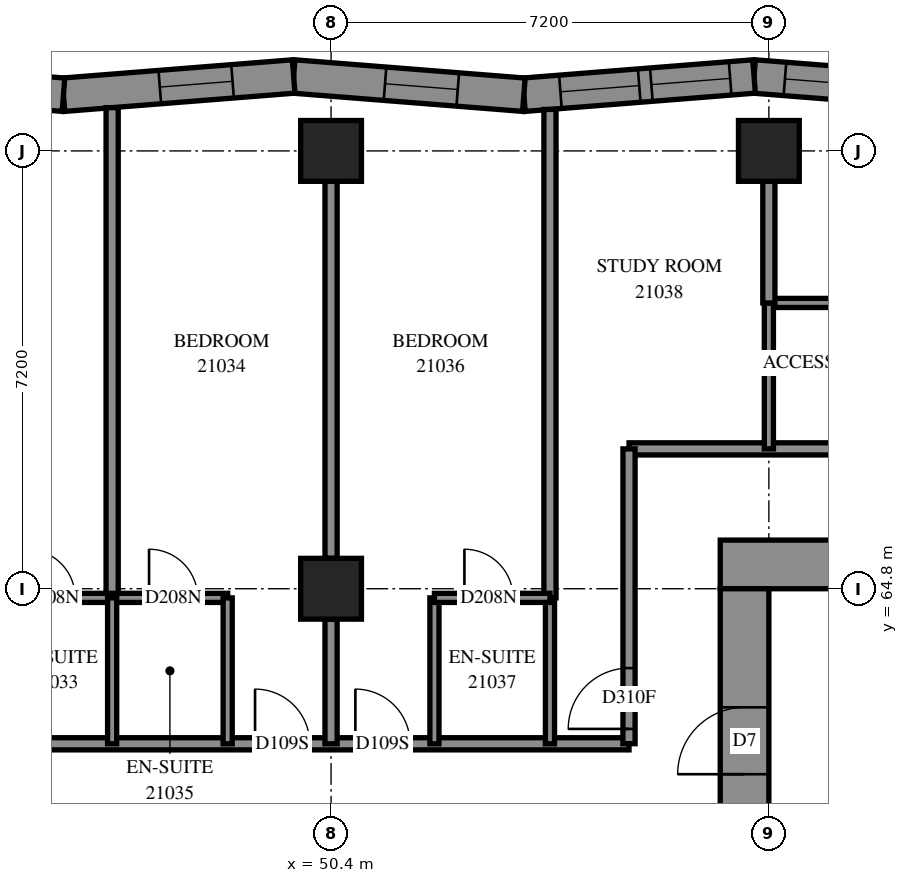
"""IFC4 building model, lengths in metres.
Left out: names, types, materials, properties, quantities, classifications, styles, units other than length and angle.
Written with IfcOpenShell. Run it as: python <this file> out.ifc"""

import sys

from ifc_helpers import new_model, si_unit, direction, frame, frame_2d, origin, origin_2d, place, context, subcontext, project, spatial, polyline, rectangle, outline, extrude, element, fill, save


model = new_model("IFC4")
c1 = context("Model", 3, precision=1e-05, world=origin(), true_north=direction((0.0, 1.0)))
c2 = subcontext(c1, "Body", "Model", "MODEL_VIEW")
j1 = project(units=[si_unit("LENGTHUNIT", "METRE"), si_unit("PLANEANGLEUNIT", "RADIAN")], contexts=[c1])
p1 = place(None, origin())
s1 = spatial("IfcSite", under=j1, at=p1, CompositionType="ELEMENT")
p2 = place(p1, origin())
s2 = spatial("IfcBuilding", under=s1, at=p2, CompositionType="ELEMENT")
p3 = place(p2, frame((0.0, 0.0, 81.2)))
s3 = spatial("IfcBuildingStorey", under=s2, at=p3, CompositionType="ELEMENT", Elevation=81.2)
for number, where, z_axis, x_axis in (
    (1, (50.4, 64.8, 0.0), (0.0, 0.0, 1.0), (1.0, 0.0, 0.0)),
    (2, (50.4, 72.0, 0.0), (0.0, 0.0, 1.0), (1.0, 0.0, 0.0)),
    (3, (57.6, 72.0, 0.0), (0.0, 0.0, 1.0), (1.0, 0.0, 0.0)),
):
    element("IfcColumn", number, at=place(p3, frame(where, z_axis=z_axis, x_axis=x_axis)), inside=s3, PredefinedType="COLUMN", context=c2, shape_type="SweptSolid", body=[
        extrude(rectangle(XDim=1.0, YDim=1.0, at=origin_2d()), origin(), (0.0, 0.0, 1.0), 3.1),
    ])
p4 = place(p3, frame((56.8, 65.2, -0.3), z_axis=(0.0, 0.0, 1.0), x_axis=(1.0, 0.0, 0.0)))
e4 = element("IfcWall", 4, at=p4, inside=s3, PredefinedType="SHEAR", context=c2, shape_type="SweptSolid", body=[
    extrude(rectangle(XDim=16.0, YDim=0.8, at=frame_2d((8.0, 0.0))), origin(), (0.0, 0.0, 1.0), 2.7),
])
p5 = place(p4, frame((10.8, 0.0, 0.3)))
e5 = element("IfcOpeningElement", 5, at=p5, cuts=e4, PredefinedType="OPENING", context=c2, shape_type="SweptSolid", body=[
    extrude(rectangle(XDim=0.8, YDim=2.1, at=frame_2d((0.4, 1.05))), frame((0.0, 0.41, 0.0), z_axis=(0.0, -1.0, 0.0), x_axis=(1.0, 0.0, 0.0)), (0.0, 0.0, 1.0), 0.82),
])
p6 = place(p3, frame((57.2, 50.4, -0.3), z_axis=(0.0, 0.0, 1.0), x_axis=(0.0, 1.0, 0.0)))
e6 = element("IfcWall", 6, at=p6, inside=s3, PredefinedType="SHEAR", context=c2, shape_type="SweptSolid", body=[
    extrude(rectangle(XDim=14.4, YDim=0.8, at=frame_2d((7.2, 0.0))), origin(), (0.0, 0.0, 1.0), 2.7),
])
p7 = place(p6, frame((4.55, 0.0, 0.3)))
e7 = element("IfcOpeningElement", 7, at=p7, cuts=e6, PredefinedType="OPENING", context=c2, shape_type="SweptSolid", body=[
    extrude(rectangle(XDim=1.1, YDim=2.1, at=frame_2d((0.55, 1.05))), frame((0.0, 0.41, 0.0), z_axis=(0.0, -1.0, 0.0), x_axis=(1.0, 0.0, 0.0)), (0.0, 0.0, 1.0), 0.82),
])
p8 = place(p6, frame((11.35, 0.0, 0.3)))
e8 = element("IfcOpeningElement", 8, at=p8, cuts=e6, PredefinedType="OPENING", context=c2, shape_type="SweptSolid", body=[
    extrude(rectangle(XDim=1.1, YDim=2.1, at=frame_2d((0.55, 1.05))), frame((0.0, 0.41, 0.0), z_axis=(0.0, -1.0, 0.0), x_axis=(1.0, 0.0, 0.0)), (0.0, 0.0, 1.0), 0.82),
])
p9 = place(p3, frame((61.142, 72.924, 0.0), z_axis=(0.0, 0.0, 1.0), x_axis=(-0.9968746163, 0.078999996, 0.0)))
e9 = element("IfcWall", 9, at=p9, inside=s3, PredefinedType="SOLIDWALL", context=c2, shape_type="SweptSolid", body=[
    extrude(outline(polyline([(0.022, -0.275), (3.819, -0.275), (3.776, 0.275), (-0.022, 0.275), (0.022, -0.275)])), origin(), (0.0, 0.0, 1.0), 3.1),
])
p10 = place(p9, frame((0.488, 0.0, 0.5)))
e10 = element("IfcOpeningElement", 10, at=p10, cuts=e9, PredefinedType="OPENING", context=c2, shape_type="SweptSolid", body=[
    extrude(rectangle(XDim=1.3, YDim=2.45, at=frame_2d((0.65, 1.225))), frame((0.0, 0.285, 0.0), z_axis=(0.0, -1.0, 0.0), x_axis=(1.0, 0.0, 0.0)), (0.0, 0.0, 1.0), 0.57),
])
p11 = place(p9, frame((1.988, 0.0, 0.5)))
e11 = element("IfcOpeningElement", 11, at=p11, cuts=e9, PredefinedType="OPENING", context=c2, shape_type="SweptSolid", body=[
    extrude(rectangle(XDim=1.3, YDim=2.45, at=frame_2d((0.65, 1.225))), frame((0.0, 0.285, 0.0), z_axis=(0.0, -1.0, 0.0), x_axis=(1.0, 0.0, 0.0)), (0.0, 0.0, 1.0), 0.57),
])
p12 = place(p3, frame((57.356, 73.224, 0.0), z_axis=(0.0, 0.0, 1.0), x_axis=(-0.9968746163, -0.078999996, 0.0)))
e12 = element("IfcWall", 12, at=p12, inside=s3, PredefinedType="SOLIDWALL", context=c2, shape_type="SweptSolid", body=[
    extrude(outline(polyline([(-0.022, -0.275), (3.776, -0.275), (3.819, 0.275), (0.022, 0.275), (-0.022, -0.275)])), origin(), (0.0, 0.0, 1.0), 3.1),
])
p13 = place(p12, frame((0.394, 0.0, 0.5)))
e13 = element("IfcOpeningElement", 13, at=p13, cuts=e12, PredefinedType="OPENING", context=c2, shape_type="SweptSolid", body=[
    extrude(rectangle(XDim=1.3, YDim=2.45, at=frame_2d((0.65, 1.225))), frame((0.0, 0.285, 0.0), z_axis=(0.0, -1.0, 0.0), x_axis=(1.0, 0.0, 0.0)), (0.0, 0.0, 1.0), 0.57),
])
p14 = place(p12, frame((1.894, 0.0, 0.5)))
e14 = element("IfcOpeningElement", 14, at=p14, cuts=e12, PredefinedType="OPENING", context=c2, shape_type="SweptSolid", body=[
    extrude(rectangle(XDim=1.3, YDim=2.45, at=frame_2d((0.65, 1.225))), frame((0.0, 0.285, 0.0), z_axis=(0.0, -1.0, 0.0), x_axis=(1.0, 0.0, 0.0)), (0.0, 0.0, 1.0), 0.57),
])
p15 = place(p3, frame((53.571, 72.924, 0.0), z_axis=(0.0, 0.0, 1.0), x_axis=(-0.9968747806, 0.0789979222, 0.0)))
e15 = element("IfcWall", 15, at=p15, inside=s3, PredefinedType="SOLIDWALL", context=c2, shape_type="SweptSolid", body=[
    extrude(outline(polyline([(0.022, -0.275), (3.819, -0.275), (3.776, 0.275), (-0.022, 0.275), (0.022, -0.275)])), origin(), (0.0, 0.0, 1.0), 3.1),
])
p16 = place(p15, frame((1.09, 0.0, 0.5)))
e16 = element("IfcOpeningElement", 16, at=p16, cuts=e15, PredefinedType="OPENING", context=c2, shape_type="SweptSolid", body=[
    extrude(rectangle(XDim=1.2, YDim=2.45, at=frame_2d((0.6, 1.225))), frame((0.0, 0.285, 0.0), z_axis=(0.0, -1.0, 0.0), x_axis=(1.0, 0.0, 0.0)), (0.0, 0.0, 1.0), 0.57),
])
p17 = place(p3, frame((49.785, 73.224, 0.0), z_axis=(0.0, 0.0, 1.0), x_axis=(-0.9968746163, -0.078999996, 0.0)))
e17 = element("IfcWall", 17, at=p17, inside=s3, PredefinedType="SOLIDWALL", context=c2, shape_type="SweptSolid", body=[
    extrude(outline(polyline([(-0.022, -0.275), (3.776, -0.275), (3.819, 0.275), (0.022, 0.275), (-0.022, -0.275)])), origin(), (0.0, 0.0, 1.0), 3.1),
])
p18 = place(p17, frame((1.008, 0.0, 0.5)))
e18 = element("IfcOpeningElement", 18, at=p18, cuts=e17, PredefinedType="OPENING", context=c2, shape_type="SweptSolid", body=[
    extrude(rectangle(XDim=1.2, YDim=2.45, at=frame_2d((0.6, 1.225))), frame((0.0, 0.285, 0.0), z_axis=(0.0, -1.0, 0.0), x_axis=(1.0, 0.0, 0.0)), (0.0, 0.0, 1.0), 0.57),
])
p19 = place(p3, frame((45.999, 72.924, 0.0), z_axis=(0.0, 0.0, 1.0), x_axis=(-0.9968746163, 0.078999996, 0.0)))
e19 = element("IfcWall", 19, at=p19, inside=s3, PredefinedType="SOLIDWALL", context=c2, shape_type="SweptSolid", body=[
    extrude(outline(polyline([(0.022, -0.275), (3.819, -0.275), (3.776, 0.275), (-0.022, 0.275), (0.022, -0.275)])), origin(), (0.0, 0.0, 1.0), 3.1),
])
p20 = place(p19, frame((0.904, 0.0, 0.5)))
e20 = element("IfcOpeningElement", 20, at=p20, cuts=e19, PredefinedType="OPENING", context=c2, shape_type="SweptSolid", body=[
    extrude(rectangle(XDim=1.2, YDim=2.45, at=frame_2d((0.6, 1.225))), frame((0.0, 0.285, 0.0), z_axis=(0.0, -1.0, 0.0), x_axis=(1.0, 0.0, 0.0)), (0.0, 0.0, 1.0), 0.57),
])
p21 = place(p3, frame((33.45, 62.25, 0.0), z_axis=(0.0, 0.0, 1.0), x_axis=(1.0, 0.0, 0.0)))
e21 = element("IfcWall", 21, at=p21, inside=s3, PredefinedType="PARTITIONING", context=c2, shape_type="SweptSolid", body=[
    extrude(rectangle(XDim=21.85, YDim=0.2, at=frame_2d((10.925, 0.0))), origin(), (0.0, 0.0, 1.0), 3.1),
])
p22 = place(p21, frame((0.144, 0.0, 0.0)))
e22 = element("IfcOpeningElement", 22, at=p22, cuts=e21, PredefinedType="OPENING", context=c2, shape_type="SweptSolid", body=[
    extrude(rectangle(XDim=1.0, YDim=2.1, at=frame_2d((0.5, 1.05))), frame((0.0, 0.11, 0.0), z_axis=(0.0, -1.0, 0.0), x_axis=(1.0, 0.0, 0.0)), (0.0, 0.0, 1.0), 0.22),
])
p23 = place(p21, frame((2.95, 0.0, 0.0)))
e23 = element("IfcOpeningElement", 23, at=p23, cuts=e21, PredefinedType="OPENING", context=c2, shape_type="SweptSolid", body=[
    extrude(rectangle(XDim=0.9, YDim=2.1, at=frame_2d((0.45, 1.05))), frame((0.0, 0.11, 0.0), z_axis=(0.0, -1.0, 0.0), x_axis=(1.0, 0.0, 0.0)), (0.0, 0.0, 1.0), 0.22),
])
p24 = place(p21, frame((8.407, 0.0, 0.0)))
e24 = element("IfcOpeningElement", 24, at=p24, cuts=e21, PredefinedType="OPENING", context=c2, shape_type="SweptSolid", body=[
    extrude(rectangle(XDim=0.9, YDim=2.1, at=frame_2d((0.45, 1.05))), frame((0.0, 0.11, 0.0), z_axis=(0.0, -1.0, 0.0), x_axis=(1.0, 0.0, 0.0)), (0.0, 0.0, 1.0), 0.22),
])
p25 = place(p21, frame((15.7, 0.0, 0.0)))
e25 = element("IfcOpeningElement", 25, at=p25, cuts=e21, PredefinedType="OPENING", context=c2, shape_type="SweptSolid", body=[
    extrude(rectangle(XDim=0.9, YDim=2.1, at=frame_2d((0.45, 1.05))), frame((0.0, 0.11, 0.0), z_axis=(0.0, -1.0, 0.0), x_axis=(1.0, 0.0, 0.0)), (0.0, 0.0, 1.0), 0.22),
])
p26 = place(p21, frame((17.35, 0.0, 0.0)))
e26 = element("IfcOpeningElement", 26, at=p26, cuts=e21, PredefinedType="OPENING", context=c2, shape_type="SweptSolid", body=[
    extrude(rectangle(XDim=0.9, YDim=2.1, at=frame_2d((0.45, 1.05))), frame((0.0, 0.11, 0.0), z_axis=(0.0, -1.0, 0.0), x_axis=(1.0, 0.0, 0.0)), (0.0, 0.0, 1.0), 0.22),
])
p27 = place(p3, frame((55.3, 67.1, 0.0), z_axis=(0.0, 0.0, 1.0), x_axis=(1.0, 0.0, 0.0)))
e27 = element("IfcWall", 27, at=p27, inside=s3, PredefinedType="PARTITIONING", context=c2, shape_type="SweptSolid", body=[
    extrude(rectangle(XDim=19.0, YDim=0.2, at=frame_2d((9.5, 0.0))), origin(), (0.0, 0.0, 1.0), 3.1),
])
p28 = place(p27, frame((6.161, 0.0, 0.0)))
e28 = element("IfcOpeningElement", 28, at=p28, cuts=e27, PredefinedType="OPENING", context=c2, shape_type="SweptSolid", body=[
    extrude(rectangle(XDim=0.9, YDim=2.1, at=frame_2d((0.45, 1.05))), frame((0.0, 0.11, 0.0), z_axis=(0.0, -1.0, 0.0), x_axis=(1.0, 0.0, 0.0)), (0.0, 0.0, 1.0), 0.22),
])
p29 = place(p27, frame((13.386, 0.0, 0.0)))
e29 = element("IfcOpeningElement", 29, at=p29, cuts=e27, PredefinedType="OPENING", context=c2, shape_type="SweptSolid", body=[
    extrude(rectangle(XDim=1.0, YDim=2.1, at=frame_2d((0.5, 1.05))), frame((0.0, 0.11, 0.0), z_axis=(0.0, -1.0, 0.0), x_axis=(1.0, 0.0, 0.0)), (0.0, 0.0, 1.0), 0.22),
])
p30 = place(p3, frame((46.8, 64.65, 0.0), z_axis=(0.0, 0.0, 1.0), x_axis=(0.0, 1.0, 0.0)))
e30 = element("IfcWall", 30, at=p30, inside=s3, PredefinedType="PARTITIONING", context=c2, shape_type="SweptSolid", body=[
    extrude(rectangle(XDim=8.062, YDim=0.2, at=frame_2d((4.031, 0.0))), origin(), (0.0, 0.0, 1.0), 3.1),
])
p31 = place(p3, frame((54.0, 64.65, 0.0), z_axis=(0.0, 0.0, 1.0), x_axis=(0.0, 1.0, 0.0)))
e31 = element("IfcWall", 31, at=p31, inside=s3, PredefinedType="PARTITIONING", context=c2, shape_type="SweptSolid", body=[
    extrude(rectangle(XDim=8.032, YDim=0.2, at=frame_2d((4.016, 0.0))), origin(), (0.0, 0.0, 1.0), 3.1),
])
p32 = place(p3, frame((50.4, 65.3, 0.0), z_axis=(0.0, 0.0, 1.0), x_axis=(0.0, 1.0, 0.0)))
e32 = element("IfcWall", 32, at=p32, inside=s3, PredefinedType="PARTITIONING", context=c2, shape_type="SweptSolid", body=[
    extrude(rectangle(XDim=6.2, YDim=0.2, at=frame_2d((3.1, 0.0))), origin(), (0.0, 0.0, 1.0), 3.1),
])
p33 = place(p3, frame((55.3, 62.252, 0.0), z_axis=(0.0, 0.0, 1.0), x_axis=(0.0, 1.0, 0.0)))
e33 = element("IfcWall", 33, at=p33, inside=s3, PredefinedType="PARTITIONING", context=c2, shape_type="SweptSolid", body=[
    extrude(rectangle(XDim=4.848, YDim=0.2, at=frame_2d((2.424, 0.0))), origin(), (0.0, 0.0, 1.0), 3.1),
])
p34 = place(p33, frame((0.243, 0.0, 0.0)))
e34 = element("IfcOpeningElement", 34, at=p34, cuts=e33, PredefinedType="OPENING", context=c2, shape_type="SweptSolid", body=[
    extrude(rectangle(XDim=1.0, YDim=2.1, at=frame_2d((0.5, 1.05))), frame((0.0, 0.11, 0.0), z_axis=(0.0, -1.0, 0.0), x_axis=(1.0, 0.0, 0.0)), (0.0, 0.0, 1.0), 0.22),
])
p35 = place(p3, frame((44.9, 64.65, 0.0), z_axis=(0.0, 0.0, 1.0), x_axis=(1.0, 0.0, 0.0)))
e35 = element("IfcWall", 35, at=p35, inside=s3, PredefinedType="PARTITIONING", context=c2, shape_type="SweptSolid", body=[
    extrude(rectangle(XDim=3.8, YDim=0.15, at=frame_2d((1.9, 0.0))), origin(), (0.0, 0.0, 1.0), 3.1),
])
p36 = place(p35, frame((0.493, 0.0, 0.0)))
e36 = element("IfcOpeningElement", 36, at=p36, cuts=e35, PredefinedType="OPENING", context=c2, shape_type="SweptSolid", body=[
    extrude(rectangle(XDim=0.8, YDim=2.1, at=frame_2d((0.4, 1.05))), frame((0.0, 0.085, 0.0), z_axis=(0.0, -1.0, 0.0), x_axis=(1.0, 0.0, 0.0)), (0.0, 0.0, 1.0), 0.17),
])
p37 = place(p35, frame((2.507, 0.0, 0.0)))
e37 = element("IfcOpeningElement", 37, at=p37, cuts=e35, PredefinedType="OPENING", context=c2, shape_type="SweptSolid", body=[
    extrude(rectangle(XDim=0.8, YDim=2.1, at=frame_2d((0.4, 1.05))), frame((0.0, 0.085, 0.0), z_axis=(0.0, -1.0, 0.0), x_axis=(1.0, 0.0, 0.0)), (0.0, 0.0, 1.0), 0.17),
])
p38 = place(p3, frame((57.6, 69.5, 0.0), z_axis=(0.0, 0.0, 1.0), x_axis=(1.0, 0.0, 0.0)))
e38 = element("IfcWall", 38, at=p38, inside=s3, PredefinedType="PARTITIONING", context=c2, shape_type="SweptSolid", body=[
    extrude(rectangle(XDim=3.2, YDim=0.15, at=frame_2d((1.6, 0.0))), origin(), (0.0, 0.0, 1.0), 3.1),
])
p39 = place(p38, frame((1.196, 0.0, 0.0)))
e39 = element("IfcOpeningElement", 39, at=p39, cuts=e38, PredefinedType="OPENING", context=c2, shape_type="SweptSolid", body=[
    extrude(rectangle(XDim=0.8, YDim=2.1, at=frame_2d((0.4, 1.05))), frame((0.0, 0.085, 0.0), z_axis=(0.0, -1.0, 0.0), x_axis=(1.0, 0.0, 0.0)), (0.0, 0.0, 1.0), 0.17),
])
for number, where, z_axis, x_axis in (
    (40, (46.8, 62.25, 0.0), (0.0, 0.0, 1.0), (0.0, 1.0, 0.0)),
    (41, (48.7, 62.25, 0.0), (0.0, 0.0, 1.0), (0.0, 1.0, 0.0)),
    (42, (52.1, 62.25, 0.0), (0.0, 0.0, 1.0), (0.0, 1.0, 0.0)),
    (43, (54.0, 62.25, 0.0), (0.0, 0.0, 1.0), (0.0, 1.0, 0.0)),
    (44, (57.6, 67.1, 0.0), (0.0, 0.0, 1.0), (0.0, 1.0, 0.0)),
):
    element("IfcWall", number, at=place(p3, frame(where, z_axis=z_axis, x_axis=x_axis)), inside=s3, PredefinedType="PARTITIONING", context=c2, shape_type="SweptSolid", body=[
        extrude(rectangle(XDim=2.4, YDim=0.15, at=frame_2d((1.2, 0.0))), origin(), (0.0, 0.0, 1.0), 3.1),
    ])
p40 = place(p3, frame((50.4, 62.25, 0.0), z_axis=(0.0, 0.0, 1.0), x_axis=(0.0, 1.0, 0.0)))
e45 = element("IfcWall", 45, at=p40, inside=s3, PredefinedType="PARTITIONING", context=c2, shape_type="SweptSolid", body=[
    extrude(rectangle(XDim=2.05, YDim=0.2, at=frame_2d((1.025, 0.0))), origin(), (0.0, 0.0, 1.0), 3.1),
])
p41 = place(p3, frame((57.6, 69.5, 0.0), z_axis=(0.0, 0.0, 1.0), x_axis=(0.0, 1.0, 0.0)))
e46 = element("IfcWall", 46, at=p41, inside=s3, PredefinedType="PARTITIONING", context=c2, shape_type="SweptSolid", body=[
    extrude(rectangle(XDim=2.0, YDim=0.2, at=frame_2d((1.0, 0.0))), origin(), (0.0, 0.0, 1.0), 3.1),
])
p42 = place(p3, frame((52.1, 64.65, 0.0), z_axis=(0.0, 0.0, 1.0), x_axis=(1.0, 0.0, 0.0)))
e47 = element("IfcWall", 47, at=p42, inside=s3, PredefinedType="PARTITIONING", context=c2, shape_type="SweptSolid", body=[
    extrude(rectangle(XDim=1.9, YDim=0.15, at=frame_2d((0.95, 0.0))), origin(), (0.0, 0.0, 1.0), 3.1),
])
p43 = place(p42, frame((0.493, 0.0, 0.0)))
e48 = element("IfcOpeningElement", 48, at=p43, cuts=e47, PredefinedType="OPENING", context=c2, shape_type="SweptSolid", body=[
    extrude(rectangle(XDim=0.8, YDim=2.1, at=frame_2d((0.4, 1.05))), frame((0.0, 0.085, 0.0), z_axis=(0.0, -1.0, 0.0), x_axis=(1.0, 0.0, 0.0)), (0.0, 0.0, 1.0), 0.17),
])
p44 = place(p11, origin())
e49 = element("IfcWindow", 49, at=p44, inside=s3, PartitioningType="SINGLE_PANEL", PredefinedType="WINDOW", context=c2, shape_type="SweptSolid", body=[
    extrude(rectangle(XDim=1.3, YDim=2.45, at=frame_2d((0.65, 1.225))), frame((0.0, 0.155, 0.0), z_axis=(0.0, -1.0, 0.0), x_axis=(1.0, 0.0, 0.0)), (0.0, 0.0, 1.0), 0.06),
])
fill(e11, e49)
p45 = place(p13, origin())
e50 = element("IfcWindow", 50, at=p45, inside=s3, PartitioningType="SINGLE_PANEL", PredefinedType="WINDOW", context=c2, shape_type="SweptSolid", body=[
    extrude(rectangle(XDim=1.3, YDim=2.45, at=frame_2d((0.65, 1.225))), frame((0.0, 0.155, 0.0), z_axis=(0.0, -1.0, 0.0), x_axis=(1.0, 0.0, 0.0)), (0.0, 0.0, 1.0), 0.06),
])
fill(e13, e50)
p46 = place(p14, origin())
e51 = element("IfcWindow", 51, at=p46, inside=s3, PartitioningType="SINGLE_PANEL", PredefinedType="WINDOW", context=c2, shape_type="SweptSolid", body=[
    extrude(rectangle(XDim=1.3, YDim=2.45, at=frame_2d((0.65, 1.225))), frame((0.0, 0.155, 0.0), z_axis=(0.0, -1.0, 0.0), x_axis=(1.0, 0.0, 0.0)), (0.0, 0.0, 1.0), 0.06),
])
fill(e14, e51)
p47 = place(p16, origin())
e52 = element("IfcWindow", 52, at=p47, inside=s3, PartitioningType="SINGLE_PANEL", PredefinedType="WINDOW", context=c2, shape_type="SweptSolid", body=[
    extrude(rectangle(XDim=1.2, YDim=2.45, at=frame_2d((0.6, 1.225))), frame((0.0, 0.155, 0.0), z_axis=(0.0, -1.0, 0.0), x_axis=(1.0, 0.0, 0.0)), (0.0, 0.0, 1.0), 0.06),
])
fill(e16, e52)
p48 = place(p18, origin())
e53 = element("IfcWindow", 53, at=p48, inside=s3, PartitioningType="SINGLE_PANEL", PredefinedType="WINDOW", context=c2, shape_type="SweptSolid", body=[
    extrude(rectangle(XDim=1.2, YDim=2.45, at=frame_2d((0.6, 1.225))), frame((0.0, 0.155, 0.0), z_axis=(0.0, -1.0, 0.0), x_axis=(1.0, 0.0, 0.0)), (0.0, 0.0, 1.0), 0.06),
])
fill(e18, e53)
p49 = place(p8, origin())
e54 = element("IfcDoor", 54, at=p49, inside=s3, OperationType="SINGLE_SWING_LEFT", PredefinedType="DOOR", context=c2, shape_type="SweptSolid", body=[
    extrude(rectangle(XDim=1.1, YDim=2.1, at=frame_2d((0.55, 1.05))), frame((0.0, 0.025, 0.0), z_axis=(0.0, -1.0, 0.0), x_axis=(1.0, 0.0, 0.0)), (0.0, 0.0, 1.0), 0.05),
])
fill(e8, e54)
p50 = place(p36, origin())
e55 = element("IfcDoor", 55, at=p50, inside=s3, OperationType="SINGLE_SWING_RIGHT", PredefinedType="DOOR", context=c2, shape_type="SweptSolid", body=[
    extrude(rectangle(XDim=0.8, YDim=2.1, at=frame_2d((0.4, 1.05))), frame((0.0, 0.025, 0.0), z_axis=(0.0, -1.0, 0.0), x_axis=(1.0, 0.0, 0.0)), (0.0, 0.0, 1.0), 0.05),
])
fill(e36, e55)
p51 = place(p25, origin())
e56 = element("IfcDoor", 56, at=p51, inside=s3, OperationType="SINGLE_SWING_LEFT", PredefinedType="DOOR", context=c2, shape_type="SweptSolid", body=[
    extrude(rectangle(XDim=0.9, YDim=2.1, at=frame_2d((0.45, 1.05))), frame((0.0, 0.025, 0.0), z_axis=(0.0, -1.0, 0.0), x_axis=(1.0, 0.0, 0.0)), (0.0, 0.0, 1.0), 0.05),
])
fill(e25, e56)
p52 = place(p37, origin())
e57 = element("IfcDoor", 57, at=p52, inside=s3, OperationType="SINGLE_SWING_RIGHT", PredefinedType="DOOR", context=c2, shape_type="SweptSolid", body=[
    extrude(rectangle(XDim=0.8, YDim=2.1, at=frame_2d((0.4, 1.05))), frame((0.0, 0.025, 0.0), z_axis=(0.0, -1.0, 0.0), x_axis=(1.0, 0.0, 0.0)), (0.0, 0.0, 1.0), 0.05),
])
fill(e37, e57)
p53 = place(p26, origin())
e58 = element("IfcDoor", 58, at=p53, inside=s3, OperationType="SINGLE_SWING_RIGHT", PredefinedType="DOOR", context=c2, shape_type="SweptSolid", body=[
    extrude(rectangle(XDim=0.9, YDim=2.1, at=frame_2d((0.45, 1.05))), frame((0.0, 0.025, 0.0), z_axis=(0.0, -1.0, 0.0), x_axis=(1.0, 0.0, 0.0)), (0.0, 0.0, 1.0), 0.05),
])
fill(e26, e58)
p54 = place(p43, origin())
e59 = element("IfcDoor", 59, at=p54, inside=s3, OperationType="SINGLE_SWING_RIGHT", PredefinedType="DOOR", context=c2, shape_type="SweptSolid", body=[
    extrude(rectangle(XDim=0.8, YDim=2.1, at=frame_2d((0.4, 1.05))), frame((0.0, 0.025, 0.0), z_axis=(0.0, -1.0, 0.0), x_axis=(1.0, 0.0, 0.0)), (0.0, 0.0, 1.0), 0.05),
])
fill(e48, e59)
p55 = place(p34, origin())
e60 = element("IfcDoor", 60, at=p55, inside=s3, OperationType="SINGLE_SWING_LEFT", PredefinedType="DOOR", context=c2, shape_type="SweptSolid", body=[
    extrude(rectangle(XDim=1.0, YDim=2.1, at=frame_2d((0.5, 1.05))), frame((0.0, 0.025, 0.0), z_axis=(0.0, -1.0, 0.0), x_axis=(1.0, 0.0, 0.0)), (0.0, 0.0, 1.0), 0.05),
])
fill(e34, e60)
save(model, sys.argv[1])
